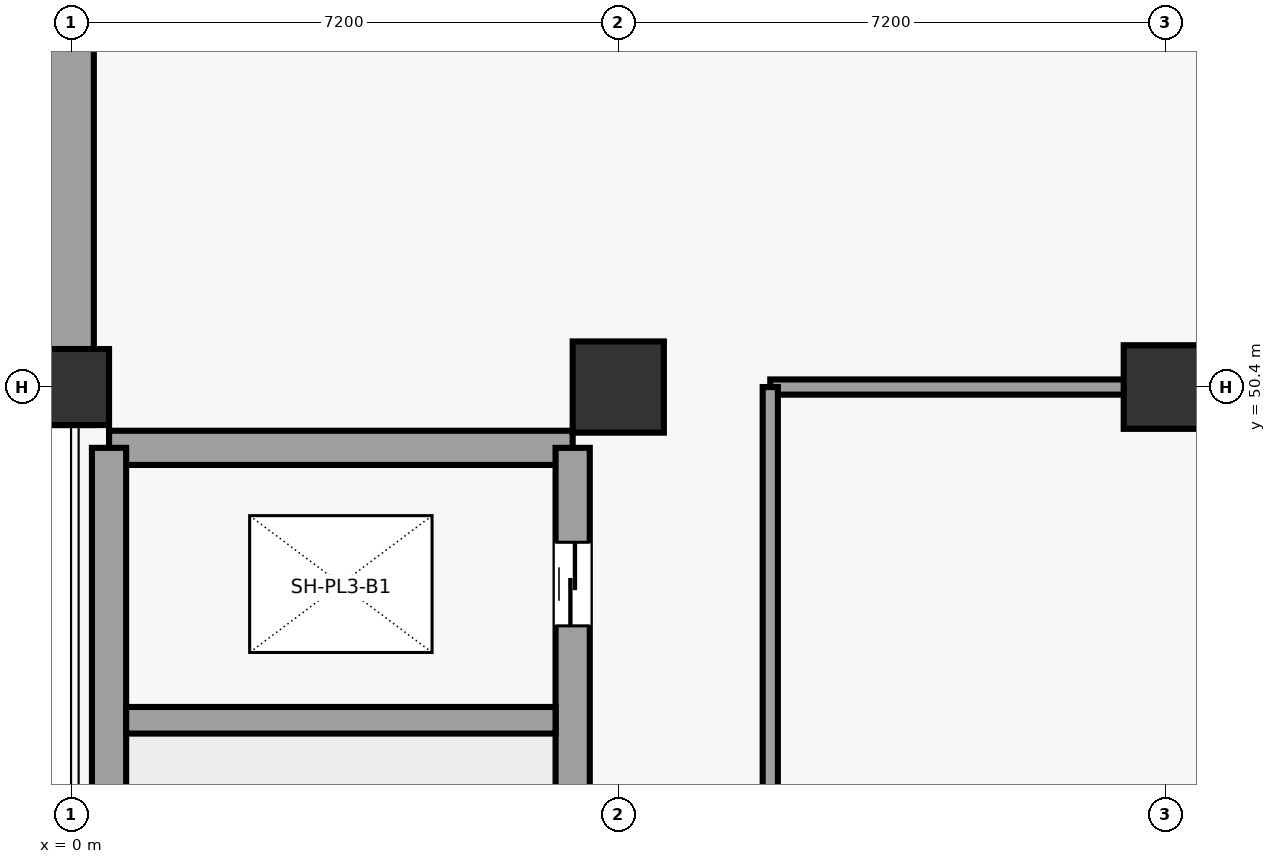
"""IFC4 building model, lengths in metres.
Left out: names, types, materials, properties, quantities, classifications, styles, units other than length and angle.
Written with IfcOpenShell. Run it as: python <this file> out.ifc"""

import sys

from ifc_helpers import new_model, si_unit, direction, frame, frame_2d, origin, origin_2d, place, context, subcontext, project, spatial, rectangle, circle, extrude, element, fill, save


model = new_model("IFC4")
c1 = context("Model", 3, precision=1e-05, world=origin(), true_north=direction((0.0, 1.0)))
c2 = subcontext(c1, "Body", "Model", "MODEL_VIEW")
j1 = project(units=[si_unit("LENGTHUNIT", "METRE"), si_unit("PLANEANGLEUNIT", "RADIAN")], contexts=[c1])
p1 = place(None, origin())
s1 = spatial("IfcSite", under=j1, at=p1, CompositionType="ELEMENT")
p2 = place(p1, origin())
s2 = spatial("IfcBuilding", under=s1, at=p2, CompositionType="ELEMENT")
p3 = place(p2, frame((0.0, 0.0, -5.4)))
s3 = spatial("IfcBuildingStorey", under=s2, at=p3, CompositionType="ELEMENT", Elevation=-5.4)
p4 = place(p3, frame((0.0, 50.4, 0.0), z_axis=(0.0, 0.0, 1.0), x_axis=(1.0, 0.0, 0.0)))
e1 = element("IfcColumn", 1, at=p4, inside=s3, PredefinedType="COLUMN", context=c2, shape_type="SweptSolid", body=[
    extrude(rectangle(XDim=1.0, YDim=1.0, at=origin_2d()), origin(), (0.0, 0.0, 1.0), 5.4),
])
p5 = place(p3, frame((7.2, 50.4, 0.0), z_axis=(0.0, 0.0, 1.0), x_axis=(1.0, 0.0, 0.0)))
e2 = element("IfcColumn", 2, at=p5, inside=s3, PredefinedType="COLUMN", context=c2, shape_type="SweptSolid", body=[
    extrude(circle(Radius=0.6, at=origin_2d()), origin(), (0.0, 0.0, 1.0), 5.4),
])
p6 = place(p3, frame((14.4, 50.4, 0.0), z_axis=(0.0, 0.0, 1.0), x_axis=(1.0, 0.0, 0.0)))
e3 = element("IfcColumn", 3, at=p6, inside=s3, PredefinedType="COLUMN", context=c2, shape_type="SweptSolid", body=[
    extrude(rectangle(XDim=1.1, YDim=1.1, at=origin_2d()), origin(), (0.0, 0.0, 1.0), 5.4),
])
p7 = place(p3, frame((0.0, 49.9, 0.0), z_axis=(0.0, 0.0, 1.0), x_axis=(0.0, 1.0, 0.0)))
e4 = element("IfcWall", 4, at=p7, inside=s3, PredefinedType="USERDEFINED", context=c2, shape_type="SweptSolid", body=[
    extrude(rectangle(XDim=29.8, YDim=0.6, at=frame_2d((14.9, 0.0))), origin(), (0.0, 0.0, 1.0), 4.98),
])
p8 = place(p3, frame((0.5, 49.6, 0.0), z_axis=(0.0, 0.0, 1.0), x_axis=(1.0, 0.0, 0.0)))
e5 = element("IfcWall", 5, at=p8, inside=s3, PredefinedType="SHEAR", context=c2, shape_type="SweptSolid", body=[
    extrude(rectangle(XDim=6.1, YDim=0.45, at=frame_2d((3.05, 0.0))), origin(), (0.0, 0.0, 1.0), 5.02),
])
p9 = place(p3, frame((0.5, 36.8, 0.0), z_axis=(0.0, 0.0, 1.0), x_axis=(0.0, 1.0, 0.0)))
e6 = element("IfcWall", 6, at=p9, inside=s3, PredefinedType="SHEAR", context=c2, shape_type="SweptSolid", body=[
    extrude(rectangle(XDim=12.8, YDim=0.45, at=frame_2d((6.4, 0.0))), origin(), (0.0, 0.0, 1.0), 5.02),
])
p10 = place(p3, frame((6.6, 36.8, 0.0), z_axis=(0.0, 0.0, 1.0), x_axis=(0.0, 1.0, 0.0)))
e7 = element("IfcWall", 7, at=p10, inside=s3, PredefinedType="SHEAR", context=c2, shape_type="SweptSolid", body=[
    extrude(rectangle(XDim=12.8, YDim=0.45, at=frame_2d((6.4, 0.0))), origin(), (0.0, 0.0, 1.0), 5.02),
])
p11 = place(p10, frame((0.55, 0.0, 0.0)))
e8 = element("IfcOpeningElement", 8, at=p11, cuts=e7, PredefinedType="OPENING", context=c2, shape_type="SweptSolid", body=[
    extrude(rectangle(XDim=1.2, YDim=2.25, at=frame_2d((0.6, 1.125))), frame((0.0, 0.235, 0.0), z_axis=(0.0, -1.0, 0.0), x_axis=(1.0, 0.0, 0.0)), (0.0, 0.0, 1.0), 0.47),
])
p12 = place(p10, frame((10.458, 0.0, 0.0)))
e9 = element("IfcOpeningElement", 9, at=p12, cuts=e7, PredefinedType="OPENING", context=c2, shape_type="SweptSolid", body=[
    extrude(rectangle(XDim=1.1, YDim=2.2, at=frame_2d((0.55, 1.1))), frame((0.0, 0.235, 0.0), z_axis=(0.0, -1.0, 0.0), x_axis=(1.0, 0.0, 0.0)), (0.0, 0.0, 1.0), 0.47),
])
p13 = place(p3, frame((0.725, 46.016, 0.0), z_axis=(0.0, 0.0, 1.0), x_axis=(1.0, 0.0, 0.0)))
e10 = element("IfcWall", 10, at=p13, inside=s3, PredefinedType="SHEAR", context=c2, shape_type="SweptSolid", body=[
    extrude(rectangle(XDim=5.65, YDim=0.35, at=frame_2d((2.825, 0.0))), origin(), (0.0, 0.0, 1.0), 5.02),
])
p14 = place(p3, frame((42.0, 50.4, 0.0), z_axis=(0.0, 0.0, 1.0), x_axis=(-1.0, 0.0, 0.0)))
e11 = element("IfcWall", 11, at=p14, inside=s3, PredefinedType="PARTITIONING", context=c2, shape_type="SweptSolid", body=[
    extrude(rectangle(XDim=32.8, YDim=0.2, at=frame_2d((16.4, 0.0))), origin(), (0.0, 0.0, 1.0), 4.04),
])
p15 = place(p3, frame((9.2, 50.4, 0.0), z_axis=(0.0, 0.0, 1.0), x_axis=(0.0, -1.0, 0.0)))
e12 = element("IfcWall", 12, at=p15, inside=s3, PredefinedType="PARTITIONING", context=c2, shape_type="SweptSolid", body=[
    extrude(rectangle(XDim=41.2, YDim=0.2, at=frame_2d((20.6, 0.0))), origin(), (0.0, 0.0, 1.0), 4.04),
])
p16 = place(p12, origin())
e13 = element("IfcDoor", 13, at=p16, inside=s3, OperationType="SLIDING_TO_LEFT", PredefinedType="DOOR", context=c2, shape_type="SweptSolid", body=[
    extrude(rectangle(XDim=1.1, YDim=2.2, at=frame_2d((0.55, 1.1))), frame((0.0, 0.025, 0.0), z_axis=(0.0, -1.0, 0.0), x_axis=(1.0, 0.0, 0.0)), (0.0, 0.0, 1.0), 0.05),
])
fill(e9, e13)
save(model, sys.argv[1])
